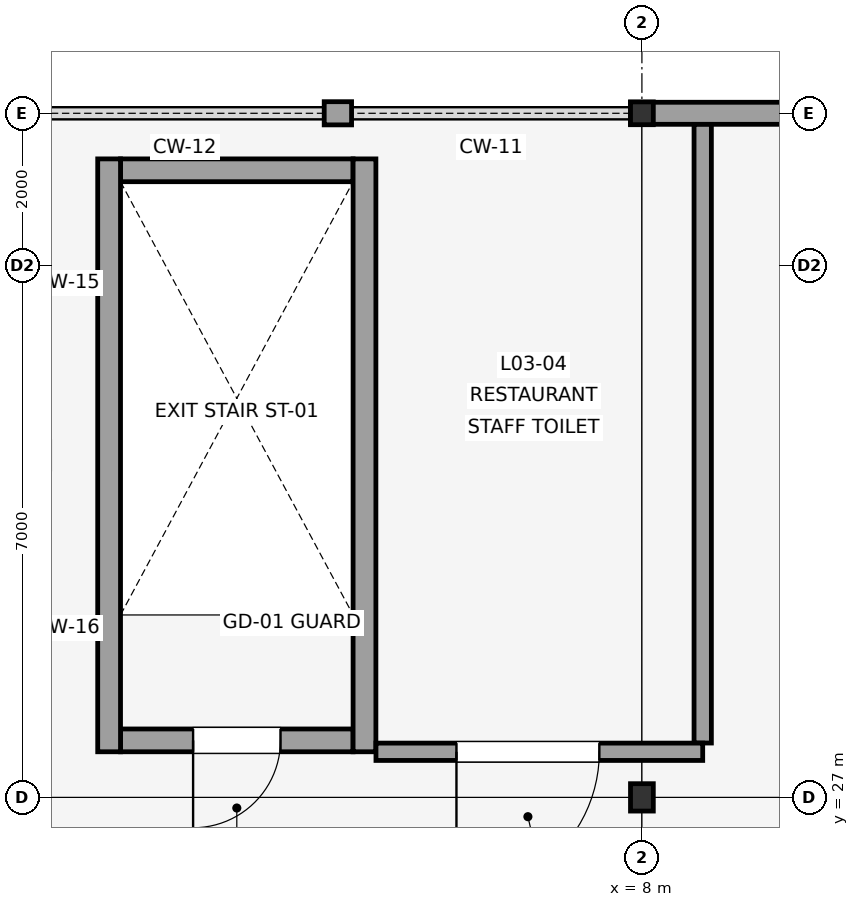
"""IFC4 building model, lengths in metres.
Left out: names, types, materials, properties, quantities, classifications, styles, units other than length and angle.
Written with IfcOpenShell. Run it as: python <this file> out.ifc"""

import sys

from ifc_helpers import new_model, si_unit, direction, frame, frame_2d, origin, origin_2d, place, context, subcontext, project, spatial, rectangle, i_section, extrude, element, fill, save


model = new_model("IFC4")
c1 = context("Model", 3, precision=1e-05, world=origin(), true_north=direction((0.0, 1.0)))
c2 = subcontext(c1, "Body", "Model", "MODEL_VIEW")
j1 = project(units=[si_unit("LENGTHUNIT", "METRE"), si_unit("PLANEANGLEUNIT", "RADIAN")], contexts=[c1])
p1 = place(None, origin())
s1 = spatial("IfcSite", under=j1, at=p1, CompositionType="ELEMENT")
p2 = place(p1, origin())
s2 = spatial("IfcBuilding", under=s1, at=p2, CompositionType="ELEMENT")
p3 = place(p2, frame((0.0, 0.0, 13.8)))
s3 = spatial("IfcBuildingStorey", under=s2, at=p3, CompositionType="ELEMENT", Elevation=13.8)
p4 = place(p3, frame((8.0, 27.0, 0.0), z_axis=(0.0, 0.0, 1.0), x_axis=(1.0, 0.0, 0.0)))
e1 = element("IfcColumn", 1, at=p4, inside=s3, PredefinedType="COLUMN", context=c2, shape_type="SweptSolid", body=[
    extrude(i_section(OverallWidth=0.3, OverallDepth=0.36, WebThickness=0.01, FlangeThickness=0.018, FilletRadius=0.027, at=origin_2d()), origin(), (0.0, 0.0, 1.0), 4.5),
])
p5 = place(p3, frame((8.0, 36.0, 0.0), z_axis=(0.0, 0.0, 1.0), x_axis=(1.0, 0.0, 0.0)))
e2 = element("IfcColumn", 2, at=p5, inside=s3, PredefinedType="COLUMN", context=c2, shape_type="SweptSolid", body=[
    extrude(i_section(OverallWidth=0.3, OverallDepth=0.3, WebThickness=0.009, FlangeThickness=0.014, FilletRadius=0.027, at=origin_2d()), origin(), (0.0, 0.0, 1.0), 4.5),
])
p6 = place(p3, frame((4.18, 36.0, 0.0), z_axis=(0.0, 0.0, 1.0), x_axis=(-1.0, 0.0, 0.0)))
e3 = element("IfcWall", 3, at=p6, inside=s3, PredefinedType="SOLIDWALL", context=c2, shape_type="SweptSolid", body=[
    extrude(rectangle(XDim=0.36, YDim=0.305, at=frame_2d((0.18, 0.0))), origin(), (0.0, 0.0, 1.0), 2.55),
])
p7 = place(p3, frame((16.15, 36.0, 0.0), z_axis=(0.0, 0.0, 1.0), x_axis=(-1.0, 0.0, 0.0)))
e4 = element("IfcWall", 4, at=p7, inside=s3, PredefinedType="SOLIDWALL", context=c2, shape_type="SweptSolid", body=[
    extrude(rectangle(XDim=8.3, YDim=0.29, at=frame_2d((4.15, 0.0))), origin(), (0.0, 0.0, 1.0), 2.55),
])
p8 = place(p3, frame((4.2, 27.75, 0.0), z_axis=(0.0, 0.0, 1.0), x_axis=(-1.0, 0.0, 0.0)))
e5 = element("IfcWall", 5, at=p8, inside=s3, PredefinedType="SHEAR", context=c2, shape_type="SweptSolid", body=[
    extrude(rectangle(XDim=3.06, YDim=0.3, at=frame_2d((1.53, 0.0))), origin(), (0.0, 0.0, 1.0), 4.5),
])
p9 = place(p8, frame((0.955, 0.0, 0.0)))
e6 = element("IfcOpeningElement", 6, at=p9, cuts=e5, PredefinedType="OPENING", context=c2, shape_type="SweptSolid", body=[
    extrude(rectangle(XDim=1.15, YDim=2.15, at=frame_2d((0.575, 1.075))), frame((0.0, 0.16, 0.0), z_axis=(0.0, -1.0, 0.0), x_axis=(1.0, 0.0, 0.0)), (0.0, 0.0, 1.0), 0.32),
])
p10 = place(p3, frame((4.2, 35.25, 0.0), z_axis=(0.0, 0.0, 1.0), x_axis=(-1.0, 0.0, 0.0)))
e7 = element("IfcWall", 7, at=p10, inside=s3, PredefinedType="SHEAR", context=c2, shape_type="SweptSolid", body=[
    extrude(rectangle(XDim=3.06, YDim=0.3, at=frame_2d((1.53, 0.0))), origin(), (0.0, 0.0, 1.0), 4.5),
])
for number, where, z_axis, x_axis in (
    (8, (4.35, 27.6, 0.0), (0.0, 0.0, 1.0), (0.0, 1.0, 0.0)),
    (9, (0.99, 27.6, 0.0), (0.0, 0.0, 1.0), (0.0, 1.0, 0.0)),
):
    element("IfcWall", number, at=place(p3, frame(where, z_axis=z_axis, x_axis=x_axis)), inside=s3, PredefinedType="SHEAR", context=c2, shape_type="SweptSolid", body=[
        extrude(rectangle(XDim=7.8, YDim=0.3, at=frame_2d((3.9, 0.0))), origin(), (0.0, 0.0, 1.0), 4.5),
    ])
p11 = place(p3, frame((8.8, 35.854, 0.0), z_axis=(0.0, 0.0, 1.0), x_axis=(0.0, -1.0, 0.0)))
e10 = element("IfcWall", 10, at=p11, inside=s3, PredefinedType="PLUMBINGWALL", context=c2, shape_type="SweptSolid", body=[
    extrude(rectangle(XDim=8.139, YDim=0.228, at=frame_2d((4.069, 0.0))), origin(), (0.0, 0.0, 1.0), 2.7),
])
p12 = place(p3, frame((8.8, 27.6, 0.0), z_axis=(0.0, 0.0, 1.0), x_axis=(-1.0, 0.0, 0.0)))
e11 = element("IfcWall", 11, at=p12, inside=s3, PredefinedType="PLUMBINGWALL", context=c2, shape_type="SweptSolid", body=[
    extrude(rectangle(XDim=4.299, YDim=0.228, at=frame_2d((2.149, 0.0))), origin(), (0.0, 0.0, 1.0), 2.7),
])
p13 = place(p12, frame((1.36, 0.0, 0.0)))
e12 = element("IfcOpeningElement", 12, at=p13, cuts=e11, PredefinedType="OPENING", context=c2, shape_type="SweptSolid", body=[
    extrude(rectangle(XDim=1.88, YDim=2.25, at=frame_2d((0.94, 1.125))), frame((0.0, 0.124, 0.0), z_axis=(0.0, -1.0, 0.0), x_axis=(1.0, 0.0, 0.0)), (0.0, 0.0, 1.0), 0.248),
])
p14 = place(p9, origin())
e13 = element("IfcDoor", 13, at=p14, inside=s3, OperationType="SINGLE_SWING_RIGHT", PredefinedType="DOOR", context=c2, shape_type="SweptSolid", body=[
    extrude(rectangle(XDim=1.15, YDim=2.15, at=frame_2d((0.575, 1.075))), frame((0.0, 0.025, 0.0), z_axis=(0.0, -1.0, 0.0), x_axis=(1.0, 0.0, 0.0)), (0.0, 0.0, 1.0), 0.05),
])
fill(e6, e13)
p15 = place(p13, origin())
e14 = element("IfcDoor", 14, at=p15, inside=s3, OperationType="SINGLE_SWING_RIGHT", PredefinedType="DOOR", context=c2, shape_type="SweptSolid", body=[
    extrude(rectangle(XDim=1.88, YDim=2.25, at=frame_2d((0.94, 1.125))), frame((0.0, 0.025, 0.0), z_axis=(0.0, -1.0, 0.0), x_axis=(1.0, 0.0, 0.0)), (0.0, 0.0, 1.0), 0.05),
])
fill(e12, e14)
save(model, sys.argv[1])
